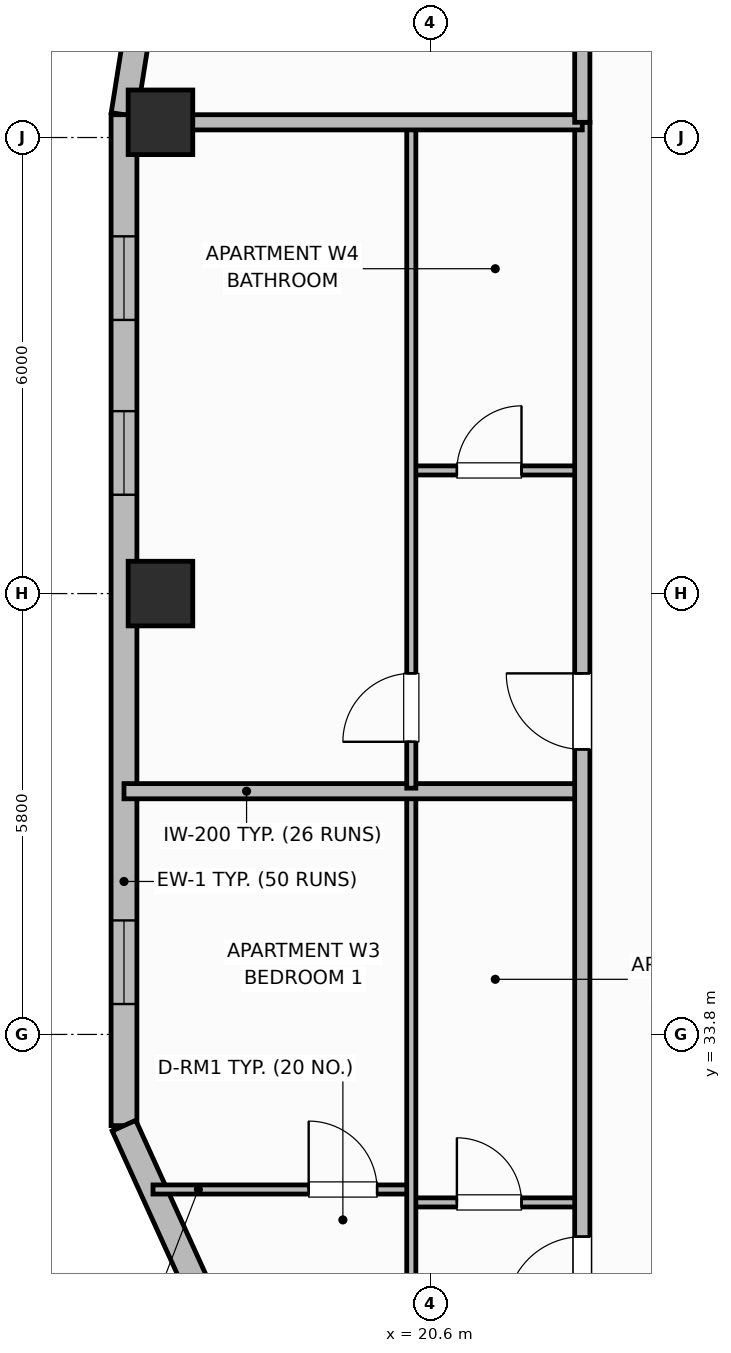
"""IFC4 building model, lengths in metres.
Left out: names, types, materials, properties, quantities, classifications, styles, units other than length and angle.
Written with IfcOpenShell. Run it as: python <this file> out.ifc"""

import sys

from ifc_helpers import new_model, si_unit, direction, frame, frame_2d, origin, origin_2d, place, context, subcontext, project, spatial, rectangle, extrude, element, fill, save


model = new_model("IFC4")
c1 = context("Model", 3, precision=1e-05, world=origin(), true_north=direction((0.0, 1.0)))
c2 = subcontext(c1, "Body", "Model", "MODEL_VIEW")
j1 = project(units=[si_unit("LENGTHUNIT", "METRE"), si_unit("PLANEANGLEUNIT", "RADIAN")], contexts=[c1])
p1 = place(None, origin())
s1 = spatial("IfcSite", under=j1, at=p1, CompositionType="ELEMENT")
p2 = place(p1, origin())
s2 = spatial("IfcBuilding", under=s1, at=p2, CompositionType="ELEMENT")
p3 = place(p2, frame((0.0, 0.0, 218.4)))
s3 = spatial("IfcBuildingStorey", under=s2, at=p3, CompositionType="ELEMENT", Elevation=218.4)
for number, where, z_axis, x_axis in (
    (1, (17.05, 39.6, 0.0), (0.0, 0.0, 1.0), (1.0, 0.0, 0.0)),
    (2, (17.05, 45.8, 0.0), (0.0, 0.0, 1.0), (1.0, 0.0, 0.0)),
):
    element("IfcColumn", number, at=place(p3, frame(where, z_axis=z_axis, x_axis=x_axis)), inside=s3, PredefinedType="COLUMN", context=c2, shape_type="SweptSolid", body=[
        extrude(rectangle(XDim=0.85, YDim=0.85, at=origin_2d()), origin(), (0.0, 0.0, 1.0), 3.7),
    ])
p4 = place(p3, frame((16.748, 47.022, 0.0), z_axis=(0.0, 0.0, 1.0), x_axis=(-0.156481329164, -0.987680916907, 0.0)))
e3 = element("IfcWall", 3, at=p4, inside=s3, PredefinedType="SOLIDWALL", context=c2, shape_type="SweptSolid", body=[
    extrude(rectangle(XDim=1.136, YDim=0.34, at=frame_2d((0.568, 0.0))), origin(), (0.0, 0.0, 1.0), 2.72),
])
p5 = place(p3, frame((16.57, 45.9, 0.0), z_axis=(0.0, 0.0, 1.0), x_axis=(0.0, -1.0, 0.0)))
e4 = element("IfcWall", 4, at=p5, inside=s3, PredefinedType="SOLIDWALL", context=c2, shape_type="SweptSolid", body=[
    extrude(rectangle(XDim=13.3, YDim=0.34, at=frame_2d((6.65, 0.0))), origin(), (0.0, 0.0, 1.0), 2.72),
])
p6 = place(p5, frame((1.6, 0.0, 0.95)))
e5 = element("IfcOpeningElement", 5, at=p6, cuts=e4, PredefinedType="OPENING", context=c2, shape_type="SweptSolid", body=[
    extrude(rectangle(XDim=1.1, YDim=1.65, at=frame_2d((0.55, 0.825))), frame((0.0, 0.18, 0.0), z_axis=(0.0, -1.0, 0.0), x_axis=(1.0, 0.0, 0.0)), (0.0, 0.0, 1.0), 0.36),
])
p7 = place(p5, frame((3.9, 0.0, 0.95)))
e6 = element("IfcOpeningElement", 6, at=p7, cuts=e4, PredefinedType="OPENING", context=c2, shape_type="SweptSolid", body=[
    extrude(rectangle(XDim=1.1, YDim=1.65, at=frame_2d((0.55, 0.825))), frame((0.0, 0.18, 0.0), z_axis=(0.0, -1.0, 0.0), x_axis=(1.0, 0.0, 0.0)), (0.0, 0.0, 1.0), 0.36),
])
p8 = place(p5, frame((10.6, 0.0, 0.95)))
e7 = element("IfcOpeningElement", 7, at=p8, cuts=e4, PredefinedType="OPENING", context=c2, shape_type="SweptSolid", body=[
    extrude(rectangle(XDim=1.1, YDim=1.65, at=frame_2d((0.55, 0.825))), frame((0.0, 0.18, 0.0), z_axis=(0.0, -1.0, 0.0), x_axis=(1.0, 0.0, 0.0)), (0.0, 0.0, 1.0), 0.36),
])
p9 = place(p3, frame((16.57, 32.6, 0.0), z_axis=(0.0, 0.0, 1.0), x_axis=(0.413772500085, -0.910380315128, 0.0)))
e8 = element("IfcWall", 8, at=p9, inside=s3, PredefinedType="SOLIDWALL", context=c2, shape_type="SweptSolid", body=[
    extrude(rectangle(XDim=2.417, YDim=0.34, at=frame_2d((1.208, 0.0))), origin(), (0.0, 0.0, 1.0), 2.72),
])
p10 = place(p3, frame((20.35, 31.59, 0.0), z_axis=(0.0, 0.0, 1.0), x_axis=(1.0, 0.0, 0.0)))
e9 = element("IfcWall", 9, at=p10, inside=s3, PredefinedType="PARTITIONING", context=c2, shape_type="SweptSolid", body=[
    extrude(rectangle(XDim=2.25, YDim=0.12, at=frame_2d((1.125, 0.0))), origin(), (0.0, 0.0, 1.0), 2.55),
])
p11 = place(p10, frame((0.6, 0.0, 0.0)))
e10 = element("IfcOpeningElement", 10, at=p11, cuts=e9, PredefinedType="OPENING", context=c2, shape_type="SweptSolid", body=[
    extrude(rectangle(XDim=0.85, YDim=2.1, at=frame_2d((0.425, 1.05))), frame((0.0, 0.07, 0.0), z_axis=(0.0, -1.0, 0.0), x_axis=(1.0, 0.0, 0.0)), (0.0, 0.0, 1.0), 0.14),
])
p12 = place(p3, frame((16.952, 31.76, 0.0), z_axis=(0.0, 0.0, 1.0), x_axis=(1.0, 0.0, 0.0)))
e11 = element("IfcWall", 11, at=p12, inside=s3, PredefinedType="PARTITIONING", context=c2, shape_type="SweptSolid", body=[
    extrude(rectangle(XDim=3.398, YDim=0.12, at=frame_2d((1.699, 0.0))), origin(), (0.0, 0.0, 1.0), 2.55),
])
p13 = place(p12, frame((2.048, 0.0, 0.0)))
e12 = element("IfcOpeningElement", 12, at=p13, cuts=e11, PredefinedType="OPENING", context=c2, shape_type="SweptSolid", body=[
    extrude(rectangle(XDim=0.9, YDim=2.1, at=frame_2d((0.45, 1.05))), frame((0.0, 0.07, 0.0), z_axis=(0.0, -1.0, 0.0), x_axis=(1.0, 0.0, 0.0)), (0.0, 0.0, 1.0), 0.14),
])
p14 = place(p3, frame((20.35, 26.64, 0.0), z_axis=(0.0, 0.0, 1.0), x_axis=(0.0, 1.0, 0.0)))
e13 = element("IfcWall", 13, at=p14, inside=s3, PredefinedType="PARTITIONING", context=c2, shape_type="SweptSolid", body=[
    extrude(rectangle(XDim=10.32, YDim=0.12, at=frame_2d((5.16, 0.0))), origin(), (0.0, 0.0, 1.0), 2.55),
])
p15 = place(p14, frame((2.81, 0.0, 0.0)))
e14 = element("IfcOpeningElement", 14, at=p15, cuts=e13, PredefinedType="OPENING", context=c2, shape_type="SweptSolid", body=[
    extrude(rectangle(XDim=0.9, YDim=2.1, at=frame_2d((0.45, 1.05))), frame((0.0, 0.07, 0.0), z_axis=(0.0, -1.0, 0.0), x_axis=(1.0, 0.0, 0.0)), (0.0, 0.0, 1.0), 0.14),
])
p16 = place(p3, frame((16.57, 37.0, 0.0), z_axis=(0.0, 0.0, 1.0), x_axis=(1.0, 0.0, 0.0)))
e15 = element("IfcWall", 15, at=p16, inside=s3, PredefinedType="PARTITIONING", context=c2, shape_type="SweptSolid", body=[
    extrude(rectangle(XDim=6.03, YDim=0.2, at=frame_2d((3.015, 0.0))), origin(), (0.0, 0.0, 1.0), 2.55),
])
p17 = place(p3, frame((20.35, 41.22, 0.0), z_axis=(0.0, 0.0, 1.0), x_axis=(1.0, 0.0, 0.0)))
e16 = element("IfcWall", 16, at=p17, inside=s3, PredefinedType="PARTITIONING", context=c2, shape_type="SweptSolid", body=[
    extrude(rectangle(XDim=2.25, YDim=0.12, at=frame_2d((1.125, 0.0))), origin(), (0.0, 0.0, 1.0), 2.55),
])
p18 = place(p17, frame((0.6, 0.0, 0.0)))
e17 = element("IfcOpeningElement", 17, at=p18, cuts=e16, PredefinedType="OPENING", context=c2, shape_type="SweptSolid", body=[
    extrude(rectangle(XDim=0.85, YDim=2.1, at=frame_2d((0.425, 1.05))), frame((0.0, 0.07, 0.0), z_axis=(0.0, -1.0, 0.0), x_axis=(1.0, 0.0, 0.0)), (0.0, 0.0, 1.0), 0.14),
])
p19 = place(p3, frame((20.35, 37.04, 0.0), z_axis=(0.0, 0.0, 1.0), x_axis=(0.0, 1.0, 0.0)))
e18 = element("IfcWall", 18, at=p19, inside=s3, PredefinedType="PARTITIONING", context=c2, shape_type="SweptSolid", body=[
    extrude(rectangle(XDim=8.72, YDim=0.12, at=frame_2d((4.36, 0.0))), origin(), (0.0, 0.0, 1.0), 2.55),
])
p20 = place(p19, frame((0.61, 0.0, 0.0)))
e19 = element("IfcOpeningElement", 19, at=p20, cuts=e18, PredefinedType="OPENING", context=c2, shape_type="SweptSolid", body=[
    extrude(rectangle(XDim=0.9, YDim=2.1, at=frame_2d((0.45, 1.05))), frame((0.0, 0.07, 0.0), z_axis=(0.0, -1.0, 0.0), x_axis=(1.0, 0.0, 0.0)), (0.0, 0.0, 1.0), 0.14),
])
p21 = place(p3, frame((22.6, 10.6, 0.0), z_axis=(0.0, 0.0, 1.0), x_axis=(0.0, 1.0, 0.0)))
e20 = element("IfcWall", 20, at=p21, inside=s3, PredefinedType="PARTITIONING", context=c2, shape_type="SweptSolid", body=[
    extrude(rectangle(XDim=35.2, YDim=0.2, at=frame_2d((17.6, 0.0))), origin(), (0.0, 0.0, 1.0), 2.55),
])
p22 = place(p21, frame((2.65, 0.0, 0.0)))
e21 = element("IfcOpeningElement", 21, at=p22, cuts=e20, PredefinedType="OPENING", context=c2, shape_type="SweptSolid", body=[
    extrude(rectangle(XDim=1.0, YDim=2.15, at=frame_2d((0.5, 1.075))), frame((0.0, 0.11, 0.0), z_axis=(0.0, -1.0, 0.0), x_axis=(1.0, 0.0, 0.0)), (0.0, 0.0, 1.0), 0.22),
])
p23 = place(p21, frame((10.81, 0.0, 0.0)))
e22 = element("IfcOpeningElement", 22, at=p23, cuts=e20, PredefinedType="OPENING", context=c2, shape_type="SweptSolid", body=[
    extrude(rectangle(XDim=1.0, YDim=2.15, at=frame_2d((0.5, 1.075))), frame((0.0, 0.11, 0.0), z_axis=(0.0, -1.0, 0.0), x_axis=(1.0, 0.0, 0.0)), (0.0, 0.0, 1.0), 0.22),
])
p24 = place(p21, frame((19.54, 0.0, 0.0)))
e23 = element("IfcOpeningElement", 23, at=p24, cuts=e20, PredefinedType="OPENING", context=c2, shape_type="SweptSolid", body=[
    extrude(rectangle(XDim=1.0, YDim=2.15, at=frame_2d((0.5, 1.075))), frame((0.0, 0.11, 0.0), z_axis=(0.0, -1.0, 0.0), x_axis=(1.0, 0.0, 0.0)), (0.0, 0.0, 1.0), 0.22),
])
p25 = place(p21, frame((26.95, 0.0, 0.0)))
e24 = element("IfcOpeningElement", 24, at=p25, cuts=e20, PredefinedType="OPENING", context=c2, shape_type="SweptSolid", body=[
    extrude(rectangle(XDim=1.0, YDim=2.15, at=frame_2d((0.5, 1.075))), frame((0.0, 0.11, 0.0), z_axis=(0.0, -1.0, 0.0), x_axis=(1.0, 0.0, 0.0)), (0.0, 0.0, 1.0), 0.22),
])
p26 = place(p3, frame((16.99, 45.8, 0.0), z_axis=(0.0, 0.0, 1.0), x_axis=(1.0, 0.0, 0.0)))
e25 = element("IfcWall", 25, at=p26, inside=s3, PredefinedType="PARTITIONING", context=c2, shape_type="SweptSolid", body=[
    extrude(rectangle(XDim=5.61, YDim=0.2, at=frame_2d((2.805, 0.0))), origin(), (0.0, 0.0, 1.0), 2.55),
])
p27 = place(p3, frame((22.6, 45.8, 0.0), z_axis=(0.0, 0.0, 1.0), x_axis=(0.0, 1.0, 0.0)))
e26 = element("IfcWall", 26, at=p27, inside=s3, PredefinedType="PARTITIONING", context=c2, shape_type="SweptSolid", body=[
    extrude(rectangle(XDim=3.73, YDim=0.2, at=frame_2d((1.865, 0.0))), origin(), (0.0, 0.0, 1.0), 2.55),
])
p28 = place(p6, origin())
e27 = element("IfcWindow", 27, at=p28, inside=s3, PartitioningType="SINGLE_PANEL", PredefinedType="WINDOW", context=c2, shape_type="SweptSolid", body=[
    extrude(rectangle(XDim=1.1, YDim=1.65, at=frame_2d((0.55, 0.825))), frame((0.0, 0.03, 0.0), z_axis=(0.0, -1.0, 0.0), x_axis=(1.0, 0.0, 0.0)), (0.0, 0.0, 1.0), 0.06),
])
fill(e5, e27)
p29 = place(p7, origin())
e28 = element("IfcWindow", 28, at=p29, inside=s3, PartitioningType="SINGLE_PANEL", PredefinedType="WINDOW", context=c2, shape_type="SweptSolid", body=[
    extrude(rectangle(XDim=1.1, YDim=1.65, at=frame_2d((0.55, 0.825))), frame((0.0, 0.03, 0.0), z_axis=(0.0, -1.0, 0.0), x_axis=(1.0, 0.0, 0.0)), (0.0, 0.0, 1.0), 0.06),
])
fill(e6, e28)
p30 = place(p8, origin())
e29 = element("IfcWindow", 29, at=p30, inside=s3, PartitioningType="SINGLE_PANEL", PredefinedType="WINDOW", context=c2, shape_type="SweptSolid", body=[
    extrude(rectangle(XDim=1.1, YDim=1.65, at=frame_2d((0.55, 0.825))), frame((0.0, 0.03, 0.0), z_axis=(0.0, -1.0, 0.0), x_axis=(1.0, 0.0, 0.0)), (0.0, 0.0, 1.0), 0.06),
])
fill(e7, e29)
p31 = place(p11, origin())
e30 = element("IfcDoor", 30, at=p31, inside=s3, OperationType="SINGLE_SWING_LEFT", PredefinedType="DOOR", context=c2, shape_type="SweptSolid", body=[
    extrude(rectangle(XDim=0.85, YDim=2.1, at=frame_2d((0.425, 1.05))), frame((0.0, 0.025, 0.0), z_axis=(0.0, -1.0, 0.0), x_axis=(1.0, 0.0, 0.0)), (0.0, 0.0, 1.0), 0.05),
])
fill(e10, e30)
p32 = place(p13, origin())
e31 = element("IfcDoor", 31, at=p32, inside=s3, OperationType="SINGLE_SWING_LEFT", PredefinedType="DOOR", context=c2, shape_type="SweptSolid", body=[
    extrude(rectangle(XDim=0.9, YDim=2.1, at=frame_2d((0.45, 1.05))), frame((0.0, 0.025, 0.0), z_axis=(0.0, -1.0, 0.0), x_axis=(1.0, 0.0, 0.0)), (0.0, 0.0, 1.0), 0.05),
])
fill(e12, e31)
p33 = place(p18, origin())
e32 = element("IfcDoor", 32, at=p33, inside=s3, OperationType="SINGLE_SWING_RIGHT", PredefinedType="DOOR", context=c2, shape_type="SweptSolid", body=[
    extrude(rectangle(XDim=0.85, YDim=2.1, at=frame_2d((0.425, 1.05))), frame((0.0, 0.025, 0.0), z_axis=(0.0, -1.0, 0.0), x_axis=(1.0, 0.0, 0.0)), (0.0, 0.0, 1.0), 0.05),
])
fill(e17, e32)
p34 = place(p20, origin())
e33 = element("IfcDoor", 33, at=p34, inside=s3, OperationType="SINGLE_SWING_LEFT", PredefinedType="DOOR", context=c2, shape_type="SweptSolid", body=[
    extrude(rectangle(XDim=0.9, YDim=2.1, at=frame_2d((0.45, 1.05))), frame((0.0, 0.025, 0.0), z_axis=(0.0, -1.0, 0.0), x_axis=(1.0, 0.0, 0.0)), (0.0, 0.0, 1.0), 0.05),
])
fill(e19, e33)
p35 = place(p24, origin())
e34 = element("IfcDoor", 34, at=p35, inside=s3, OperationType="SINGLE_SWING_LEFT", PredefinedType="DOOR", context=c2, shape_type="SweptSolid", body=[
    extrude(rectangle(XDim=1.0, YDim=2.15, at=frame_2d((0.5, 1.075))), frame((0.0, 0.025, 0.0), z_axis=(0.0, -1.0, 0.0), x_axis=(1.0, 0.0, 0.0)), (0.0, 0.0, 1.0), 0.05),
])
fill(e23, e34)
p36 = place(p25, origin())
e35 = element("IfcDoor", 35, at=p36, inside=s3, OperationType="SINGLE_SWING_RIGHT", PredefinedType="DOOR", context=c2, shape_type="SweptSolid", body=[
    extrude(rectangle(XDim=1.0, YDim=2.15, at=frame_2d((0.5, 1.075))), frame((0.0, 0.025, 0.0), z_axis=(0.0, -1.0, 0.0), x_axis=(1.0, 0.0, 0.0)), (0.0, 0.0, 1.0), 0.05),
])
fill(e24, e35)
save(model, sys.argv[1])
